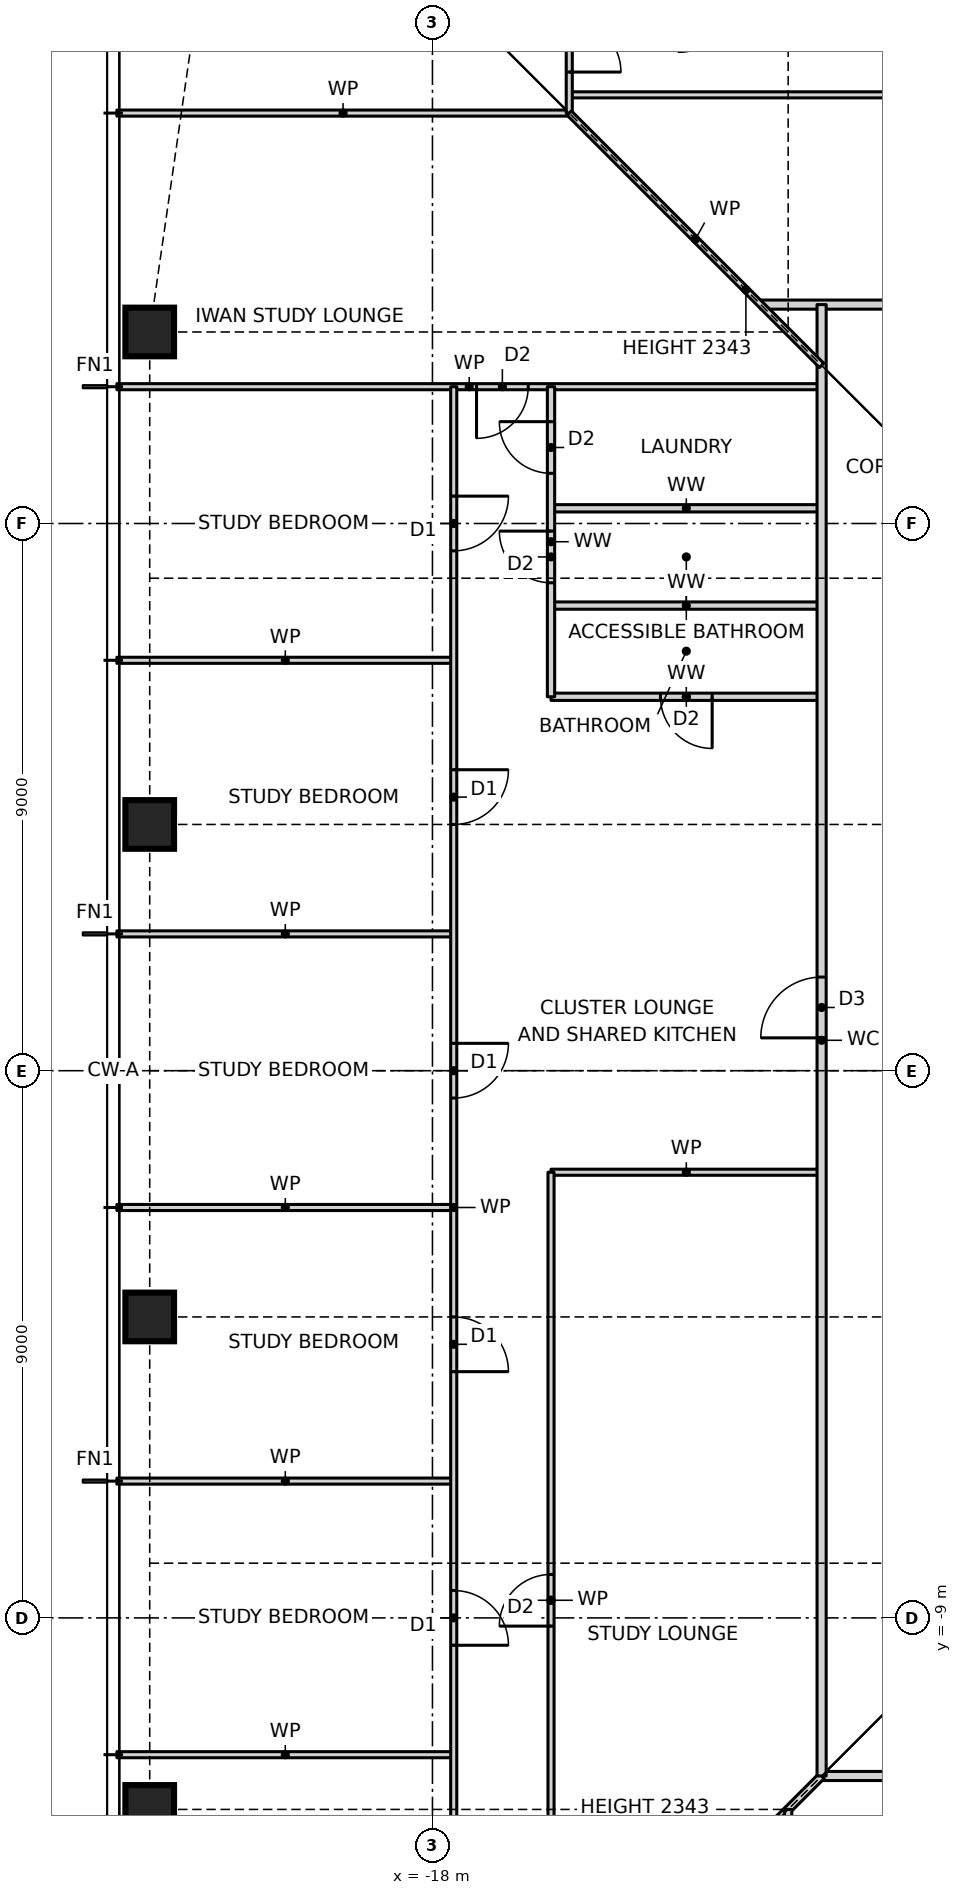
"""IFC4 building model, lengths in metres.
Left out: names, types, materials, properties, quantities, classifications, styles, units other than length and angle.
Written with IfcOpenShell. Run it as: python <this file> out.ifc"""

import sys

from ifc_helpers import new_model, si_unit, direction, frame, frame_2d, origin, origin_2d, place, context, subcontext, project, spatial, rectangle, hollow_rectangle, extrude, element, fill, save


model = new_model("IFC4")
c1 = context("Model", 3, precision=1e-05, world=origin(), true_north=direction((0.0, 1.0)))
c2 = subcontext(c1, "Body", "Model", "MODEL_VIEW")
j1 = project(units=[si_unit("LENGTHUNIT", "METRE"), si_unit("PLANEANGLEUNIT", "RADIAN")], contexts=[c1])
p1 = place(None, origin())
s1 = spatial("IfcSite", under=j1, at=p1, CompositionType="ELEMENT")
p2 = place(p1, origin())
s2 = spatial("IfcBuilding", under=s1, at=p2, CompositionType="ELEMENT")
p3 = place(p2, frame((0.0, 0.0, 39.5)))
s3 = spatial("IfcBuildingStorey", under=s2, at=p3, CompositionType="ELEMENT", Elevation=39.5)
for number, where, z_axis, x_axis in (
    (1, (-22.65, 12.15, 0.0), (0.0, 0.0, 1.0), (1.0, 0.0, 0.0)),
    (2, (-22.65, 4.05, 0.0), (0.0, 0.0, 1.0), (1.0, 0.0, 0.0)),
    (3, (-22.65, -4.05, 0.0), (0.0, 0.0, 1.0), (1.0, 0.0, 0.0)),
    (4, (-22.65, -12.15, 0.0), (0.0, 0.0, 1.0), (1.0, 0.0, 0.0)),
):
    element("IfcColumn", number, at=place(p3, frame(where, z_axis=z_axis, x_axis=x_axis)), inside=s3, PredefinedType="COLUMN", context=c2, shape_type="SweptSolid", body=[
        extrude(hollow_rectangle(XDim=0.8, YDim=0.8, WallThickness=0.09, at=origin_2d()), origin(), (0.0, 0.0, 1.0), 3.5),
    ])
p4 = place(p3, frame((-11.6, -11.6, 0.0), z_axis=(0.0, 0.0, 1.0), x_axis=(1.0, 0.0, 0.0)))
e5 = element("IfcWall", 5, at=p4, inside=s3, PredefinedType="PARTITIONING", context=c2, shape_type="SweptSolid", body=[
    extrude(rectangle(XDim=23.2, YDim=0.15, at=frame_2d((11.6, 0.0))), origin(), (0.0, 0.0, 1.0), 3.27),
])
p5 = place(p4, frame((2.975, 0.0, 0.0)))
e6 = element("IfcOpeningElement", 6, at=p5, cuts=e5, PredefinedType="OPENING", context=c2, shape_type="SweptSolid", body=[
    extrude(rectangle(XDim=1.0, YDim=2.1, at=frame_2d((0.5, 1.05))), frame((0.0, 0.085, 0.0), z_axis=(0.0, -1.0, 0.0), x_axis=(1.0, 0.0, 0.0)), (0.0, 0.0, 1.0), 0.17),
])
p6 = place(p4, frame((18.6, 0.0, 0.0)))
e7 = element("IfcOpeningElement", 7, at=p6, cuts=e5, PredefinedType="OPENING", context=c2, shape_type="SweptSolid", body=[
    extrude(rectangle(XDim=1.0, YDim=2.1, at=frame_2d((0.5, 1.05))), frame((0.0, 0.085, 0.0), z_axis=(0.0, -1.0, 0.0), x_axis=(1.0, 0.0, 0.0)), (0.0, 0.0, 1.0), 0.17),
])
for number, where, z_axis, x_axis in (
    (8, (-23.19, -11.25, 0.0), (0.0, 0.0, 1.0), (1.0, 0.0, 0.0)),
    (9, (-23.19, -6.75, 0.0), (0.0, 0.0, 1.0), (1.0, 0.0, 0.0)),
    (10, (-23.19, -2.25, 0.0), (0.0, 0.0, 1.0), (1.0, 0.0, 0.0)),
):
    element("IfcWall", number, at=place(p3, frame(where, z_axis=z_axis, x_axis=x_axis)), inside=s3, PredefinedType="PARTITIONING", context=c2, shape_type="SweptSolid", body=[
        extrude(rectangle(XDim=5.54, YDim=0.1, at=frame_2d((2.77, 0.0))), origin(), (0.0, 0.0, 1.0), 3.27),
    ])
p7 = place(p3, frame((-16.05, -1.67, 0.0), z_axis=(0.0, 0.0, 1.0), x_axis=(1.0, 0.0, 0.0)))
e11 = element("IfcWall", 11, at=p7, inside=s3, PredefinedType="PARTITIONING", context=c2, shape_type="SweptSolid", body=[
    extrude(rectangle(XDim=4.45, YDim=0.1, at=frame_2d((2.225, 0.0))), origin(), (0.0, 0.0, 1.0), 3.27),
])
p8 = place(p3, frame((-23.19, 2.25, 0.0), z_axis=(0.0, 0.0, 1.0), x_axis=(1.0, 0.0, 0.0)))
e12 = element("IfcWall", 12, at=p8, inside=s3, PredefinedType="PARTITIONING", context=c2, shape_type="SweptSolid", body=[
    extrude(rectangle(XDim=5.54, YDim=0.1, at=frame_2d((2.77, 0.0))), origin(), (0.0, 0.0, 1.0), 3.27),
])
p9 = place(p3, frame((-16.05, 6.15, 0.0), z_axis=(0.0, 0.0, 1.0), x_axis=(1.0, 0.0, 0.0)))
e13 = element("IfcWall", 13, at=p9, inside=s3, PredefinedType="PARTITIONING", context=c2, shape_type="SweptSolid", body=[
    extrude(rectangle(XDim=4.45, YDim=0.12, at=frame_2d((2.225, 0.0))), origin(), (0.0, 0.0, 1.0), 3.27),
])
p10 = place(p9, frame((1.8, 0.0, 0.0)))
e14 = element("IfcOpeningElement", 14, at=p10, cuts=e13, PredefinedType="OPENING", context=c2, shape_type="SweptSolid", body=[
    extrude(rectangle(XDim=0.85, YDim=2.1, at=frame_2d((0.425, 1.05))), frame((0.0, 0.07, 0.0), z_axis=(0.0, -1.0, 0.0), x_axis=(1.0, 0.0, 0.0)), (0.0, 0.0, 1.0), 0.14),
])
p11 = place(p3, frame((-23.19, 6.75, 0.0), z_axis=(0.0, 0.0, 1.0), x_axis=(1.0, 0.0, 0.0)))
e15 = element("IfcWall", 15, at=p11, inside=s3, PredefinedType="PARTITIONING", context=c2, shape_type="SweptSolid", body=[
    extrude(rectangle(XDim=5.54, YDim=0.1, at=frame_2d((2.77, 0.0))), origin(), (0.0, 0.0, 1.0), 3.27),
])
for number, where, z_axis, x_axis in (
    (16, (-16.05, 7.65, 0.0), (0.0, 0.0, 1.0), (1.0, 0.0, 0.0)),
    (17, (-16.05, 9.25, 0.0), (0.0, 0.0, 1.0), (1.0, 0.0, 0.0)),
):
    element("IfcWall", number, at=place(p3, frame(where, z_axis=z_axis, x_axis=x_axis)), inside=s3, PredefinedType="PARTITIONING", context=c2, shape_type="SweptSolid", body=[
        extrude(rectangle(XDim=4.45, YDim=0.12, at=frame_2d((2.225, 0.0))), origin(), (0.0, 0.0, 1.0), 3.27),
    ])
p12 = place(p3, frame((-23.19, 11.25, 0.0), z_axis=(0.0, 0.0, 1.0), x_axis=(1.0, 0.0, 0.0)))
e18 = element("IfcWall", 18, at=p12, inside=s3, PredefinedType="PARTITIONING", context=c2, shape_type="SweptSolid", body=[
    extrude(rectangle(XDim=11.59, YDim=0.1, at=frame_2d((5.795, 0.0))), origin(), (0.0, 0.0, 1.0), 3.27),
])
p13 = place(p12, frame((5.915, 0.0, 0.0)))
e19 = element("IfcOpeningElement", 19, at=p13, cuts=e18, PredefinedType="OPENING", context=c2, shape_type="SweptSolid", body=[
    extrude(rectangle(XDim=0.85, YDim=2.1, at=frame_2d((0.425, 1.05))), frame((0.0, 0.06, 0.0), z_axis=(0.0, -1.0, 0.0), x_axis=(1.0, 0.0, 0.0)), (0.0, 0.0, 1.0), 0.12),
])
p14 = place(p3, frame((-12.6, 12.6, 0.0), z_axis=(0.0, 0.0, 1.0), x_axis=(1.0, 0.0, 0.0)))
e20 = element("IfcWall", 20, at=p14, inside=s3, PredefinedType="PARTITIONING", context=c2, shape_type="SweptSolid", body=[
    extrude(rectangle(XDim=25.2, YDim=0.15, at=frame_2d((12.6, 0.0))), origin(), (0.0, 0.0, 1.0), 3.27),
])
p15 = place(p14, frame((16.15, 0.0, 0.0)))
e21 = element("IfcOpeningElement", 21, at=p15, cuts=e20, PredefinedType="OPENING", context=c2, shape_type="SweptSolid", body=[
    extrude(rectangle(XDim=1.0, YDim=2.1, at=frame_2d((0.5, 1.05))), frame((0.0, 0.085, 0.0), z_axis=(0.0, -1.0, 0.0), x_axis=(1.0, 0.0, 0.0)), (0.0, 0.0, 1.0), 0.17),
])
p16 = place(p14, frame((19.0, 0.0, 0.0)))
e22 = element("IfcOpeningElement", 22, at=p16, cuts=e20, PredefinedType="OPENING", context=c2, shape_type="SweptSolid", body=[
    extrude(rectangle(XDim=0.9, YDim=2.1, at=frame_2d((0.45, 1.05))), frame((0.0, 0.085, 0.0), z_axis=(0.0, -1.0, 0.0), x_axis=(1.0, 0.0, 0.0)), (0.0, 0.0, 1.0), 0.17),
])
p17 = place(p3, frame((-23.19, 15.75, 0.0), z_axis=(0.0, 0.0, 1.0), x_axis=(1.0, 0.0, 0.0)))
e23 = element("IfcWall", 23, at=p17, inside=s3, PredefinedType="PARTITIONING", context=c2, shape_type="SweptSolid", body=[
    extrude(rectangle(XDim=7.44, YDim=0.1, at=frame_2d((3.72, 0.0))), origin(), (0.0, 0.0, 1.0), 3.27),
])
p18 = place(p3, frame((-15.75, 16.05, 0.0), z_axis=(0.0, 0.0, 1.0), x_axis=(1.0, 0.0, 0.0)))
e24 = element("IfcWall", 24, at=p18, inside=s3, PredefinedType="PARTITIONING", context=c2, shape_type="SweptSolid", body=[
    extrude(rectangle(XDim=17.9, YDim=0.1, at=frame_2d((8.95, 0.0))), origin(), (0.0, 0.0, 1.0), 3.27),
])
p19 = place(p18, frame((8.525, 0.0, 0.0)))
e25 = element("IfcOpeningElement", 25, at=p19, cuts=e24, PredefinedType="OPENING", context=c2, shape_type="SweptSolid", body=[
    extrude(rectangle(XDim=0.85, YDim=2.1, at=frame_2d((0.425, 1.05))), frame((0.0, 0.06, 0.0), z_axis=(0.0, -1.0, 0.0), x_axis=(1.0, 0.0, 0.0)), (0.0, 0.0, 1.0), 0.12),
])
p20 = place(p3, frame((-15.75, -15.75, 0.0), z_axis=(0.0, 0.0, 1.0), x_axis=(0.707106781187, 0.707106781187, 0.0)))
e26 = element("IfcWall", 26, at=p20, inside=s3, PredefinedType="PARTITIONING", context=c2, shape_type="SweptSolid", body=[
    extrude(rectangle(XDim=5.869, YDim=0.12, at=frame_2d((2.935, 0.0))), origin(), (0.0, 0.0, 1.0), 2.343),
])
p21 = place(p3, frame((-11.6, -11.6, 0.0), z_axis=(0.0, 0.0, 1.0), x_axis=(0.0, 1.0, 0.0)))
e27 = element("IfcWall", 27, at=p21, inside=s3, PredefinedType="PARTITIONING", context=c2, shape_type="SweptSolid", body=[
    extrude(rectangle(XDim=24.2, YDim=0.15, at=frame_2d((12.1, 0.0))), origin(), (0.0, 0.0, 1.0), 3.27),
])
p22 = place(p21, frame((12.14, 0.0, 0.0)))
e28 = element("IfcOpeningElement", 28, at=p22, cuts=e27, PredefinedType="OPENING", context=c2, shape_type="SweptSolid", body=[
    extrude(rectangle(XDim=1.0, YDim=2.1, at=frame_2d((0.5, 1.05))), frame((0.0, 0.085, 0.0), z_axis=(0.0, -1.0, 0.0), x_axis=(1.0, 0.0, 0.0)), (0.0, 0.0, 1.0), 0.17),
])
p23 = place(p3, frame((-12.15, -16.05, 0.0), z_axis=(0.0, 0.0, 1.0), x_axis=(0.0, 1.0, 0.0)))
e29 = element("IfcWall", 29, at=p23, inside=s3, PredefinedType="PARTITIONING", context=c2, shape_type="SweptSolid", body=[
    extrude(rectangle(XDim=3.9, YDim=0.12, at=frame_2d((1.95, 0.0))), origin(), (0.0, 0.0, 1.0), 2.508),
])
p24 = place(p23, frame((1.525, 0.0, 0.0)))
e30 = element("IfcOpeningElement", 30, at=p24, cuts=e29, PredefinedType="OPENING", context=c2, shape_type="SweptSolid", body=[
    extrude(rectangle(XDim=0.85, YDim=2.1, at=frame_2d((0.425, 1.05))), frame((0.0, 0.07, 0.0), z_axis=(0.0, -1.0, 0.0), x_axis=(1.0, 0.0, 0.0)), (0.0, 0.0, 1.0), 0.14),
])
p25 = place(p3, frame((-15.75, 15.75, 0.0), z_axis=(0.0, 0.0, 1.0), x_axis=(0.0, 1.0, 0.0)))
e31 = element("IfcWall", 31, at=p25, inside=s3, PredefinedType="PARTITIONING", context=c2, shape_type="SweptSolid", body=[
    extrude(rectangle(XDim=7.44, YDim=0.1, at=frame_2d((3.72, 0.0))), origin(), (0.0, 0.0, 1.0), 3.27),
])
p26 = place(p25, frame((0.675, 0.0, 0.0)))
e32 = element("IfcOpeningElement", 32, at=p26, cuts=e31, PredefinedType="OPENING", context=c2, shape_type="SweptSolid", body=[
    extrude(rectangle(XDim=0.85, YDim=2.1, at=frame_2d((0.425, 1.05))), frame((0.0, 0.06, 0.0), z_axis=(0.0, -1.0, 0.0), x_axis=(1.0, 0.0, 0.0)), (0.0, 0.0, 1.0), 0.12),
])
p27 = place(p3, frame((-16.05, -15.75, 0.0), z_axis=(0.0, 0.0, 1.0), x_axis=(0.0, 1.0, 0.0)))
e33 = element("IfcWall", 33, at=p27, inside=s3, PredefinedType="PARTITIONING", context=c2, shape_type="SweptSolid", body=[
    extrude(rectangle(XDim=14.08, YDim=0.1, at=frame_2d((7.04, 0.0))), origin(), (0.0, 0.0, 1.0), 3.27),
])
p28 = place(p27, frame((6.615, 0.0, 0.0)))
e34 = element("IfcOpeningElement", 34, at=p28, cuts=e33, PredefinedType="OPENING", context=c2, shape_type="SweptSolid", body=[
    extrude(rectangle(XDim=0.85, YDim=2.1, at=frame_2d((0.425, 1.05))), frame((0.0, 0.06, 0.0), z_axis=(0.0, -1.0, 0.0), x_axis=(1.0, 0.0, 0.0)), (0.0, 0.0, 1.0), 0.12),
])
p29 = place(p3, frame((-16.05, 6.15, 0.0), z_axis=(0.0, 0.0, 1.0), x_axis=(0.0, 1.0, 0.0)))
e35 = element("IfcWall", 35, at=p29, inside=s3, PredefinedType="PARTITIONING", context=c2, shape_type="SweptSolid", body=[
    extrude(rectangle(XDim=5.1, YDim=0.12, at=frame_2d((2.55, 0.0))), origin(), (0.0, 0.0, 1.0), 3.27),
])
p30 = place(p29, frame((3.675, 0.0, 0.0)))
e36 = element("IfcOpeningElement", 36, at=p30, cuts=e35, PredefinedType="OPENING", context=c2, shape_type="SweptSolid", body=[
    extrude(rectangle(XDim=0.85, YDim=2.1, at=frame_2d((0.425, 1.05))), frame((0.0, 0.07, 0.0), z_axis=(0.0, -1.0, 0.0), x_axis=(1.0, 0.0, 0.0)), (0.0, 0.0, 1.0), 0.14),
])
p31 = place(p29, frame((1.875, 0.0, 0.0)))
e37 = element("IfcOpeningElement", 37, at=p31, cuts=e35, PredefinedType="OPENING", context=c2, shape_type="SweptSolid", body=[
    extrude(rectangle(XDim=0.85, YDim=2.1, at=frame_2d((0.425, 1.05))), frame((0.0, 0.07, 0.0), z_axis=(0.0, -1.0, 0.0), x_axis=(1.0, 0.0, 0.0)), (0.0, 0.0, 1.0), 0.14),
])
p32 = place(p3, frame((-17.65, -15.75, 0.0), z_axis=(0.0, 0.0, 1.0), x_axis=(0.0, 1.0, 0.0)))
e38 = element("IfcWall", 38, at=p32, inside=s3, PredefinedType="PARTITIONING", context=c2, shape_type="SweptSolid", body=[
    extrude(rectangle(XDim=27.0, YDim=0.1, at=frame_2d((13.5, 0.0))), origin(), (0.0, 0.0, 1.0), 3.27),
])
p33 = place(p32, frame((24.3, 0.0, 0.0)))
e39 = element("IfcOpeningElement", 39, at=p33, cuts=e38, PredefinedType="OPENING", context=c2, shape_type="SweptSolid", body=[
    extrude(rectangle(XDim=0.9, YDim=2.1, at=frame_2d((0.45, 1.05))), frame((0.0, 0.06, 0.0), z_axis=(0.0, -1.0, 0.0), x_axis=(1.0, 0.0, 0.0)), (0.0, 0.0, 1.0), 0.12),
])
p34 = place(p32, frame((19.8, 0.0, 0.0)))
e40 = element("IfcOpeningElement", 40, at=p34, cuts=e38, PredefinedType="OPENING", context=c2, shape_type="SweptSolid", body=[
    extrude(rectangle(XDim=0.9, YDim=2.1, at=frame_2d((0.45, 1.05))), frame((0.0, 0.06, 0.0), z_axis=(0.0, -1.0, 0.0), x_axis=(1.0, 0.0, 0.0)), (0.0, 0.0, 1.0), 0.12),
])
p35 = place(p32, frame((15.3, 0.0, 0.0)))
e41 = element("IfcOpeningElement", 41, at=p35, cuts=e38, PredefinedType="OPENING", context=c2, shape_type="SweptSolid", body=[
    extrude(rectangle(XDim=0.9, YDim=2.1, at=frame_2d((0.45, 1.05))), frame((0.0, 0.06, 0.0), z_axis=(0.0, -1.0, 0.0), x_axis=(1.0, 0.0, 0.0)), (0.0, 0.0, 1.0), 0.12),
])
p36 = place(p32, frame((10.8, 0.0, 0.0)))
e42 = element("IfcOpeningElement", 42, at=p36, cuts=e38, PredefinedType="OPENING", context=c2, shape_type="SweptSolid", body=[
    extrude(rectangle(XDim=0.9, YDim=2.1, at=frame_2d((0.45, 1.05))), frame((0.0, 0.06, 0.0), z_axis=(0.0, -1.0, 0.0), x_axis=(1.0, 0.0, 0.0)), (0.0, 0.0, 1.0), 0.12),
])
p37 = place(p32, frame((6.3, 0.0, 0.0)))
e43 = element("IfcOpeningElement", 43, at=p37, cuts=e38, PredefinedType="OPENING", context=c2, shape_type="SweptSolid", body=[
    extrude(rectangle(XDim=0.9, YDim=2.1, at=frame_2d((0.45, 1.05))), frame((0.0, 0.06, 0.0), z_axis=(0.0, -1.0, 0.0), x_axis=(1.0, 0.0, 0.0)), (0.0, 0.0, 1.0), 0.12),
])
p38 = place(p32, frame((1.8, 0.0, 0.0)))
e44 = element("IfcOpeningElement", 44, at=p38, cuts=e38, PredefinedType="OPENING", context=c2, shape_type="SweptSolid", body=[
    extrude(rectangle(XDim=0.9, YDim=2.1, at=frame_2d((0.45, 1.05))), frame((0.0, 0.06, 0.0), z_axis=(0.0, -1.0, 0.0), x_axis=(1.0, 0.0, 0.0)), (0.0, 0.0, 1.0), 0.12),
])
p39 = place(p3, frame((-11.6, 11.6, 0.0), z_axis=(0.0, 0.0, 1.0), x_axis=(-0.707106781187, 0.707106781187, 0.0)))
e45 = element("IfcWall", 45, at=p39, inside=s3, PredefinedType="PARTITIONING", context=c2, shape_type="SweptSolid", body=[
    extrude(rectangle(XDim=5.869, YDim=0.1, at=frame_2d((2.935, 0.0))), origin(), (0.0, 0.0, 1.0), 2.343),
])
p40 = place(p13, frame((0.85, 0.0, 0.0), z_axis=(0.0, 0.0, 1.0), x_axis=(-1.0, 0.0, 0.0)))
e46 = element("IfcDoor", 46, at=p40, inside=s3, OperationType="SINGLE_SWING_RIGHT", PredefinedType="DOOR", context=c2, shape_type="SweptSolid", body=[
    extrude(rectangle(XDim=0.85, YDim=2.1, at=frame_2d((0.425, 1.05))), frame((0.0, 0.025, 0.0), z_axis=(0.0, -1.0, 0.0), x_axis=(1.0, 0.0, 0.0)), (0.0, 0.0, 1.0), 0.05),
])
fill(e19, e46)
p41 = place(p33, frame((0.9, 0.0, 0.0), z_axis=(0.0, 0.0, 1.0), x_axis=(-1.0, 0.0, 0.0)))
e47 = element("IfcDoor", 47, at=p41, inside=s3, OperationType="SINGLE_SWING_LEFT", PredefinedType="DOOR", context=c2, shape_type="SweptSolid", body=[
    extrude(rectangle(XDim=0.9, YDim=2.1, at=frame_2d((0.45, 1.05))), frame((0.0, 0.025, 0.0), z_axis=(0.0, -1.0, 0.0), x_axis=(1.0, 0.0, 0.0)), (0.0, 0.0, 1.0), 0.05),
])
fill(e39, e47)
p42 = place(p34, frame((0.9, 0.0, 0.0), z_axis=(0.0, 0.0, 1.0), x_axis=(-1.0, 0.0, 0.0)))
e48 = element("IfcDoor", 48, at=p42, inside=s3, OperationType="SINGLE_SWING_LEFT", PredefinedType="DOOR", context=c2, shape_type="SweptSolid", body=[
    extrude(rectangle(XDim=0.9, YDim=2.1, at=frame_2d((0.45, 1.05))), frame((0.0, 0.025, 0.0), z_axis=(0.0, -1.0, 0.0), x_axis=(1.0, 0.0, 0.0)), (0.0, 0.0, 1.0), 0.05),
])
fill(e40, e48)
p43 = place(p35, frame((0.9, 0.0, 0.0), z_axis=(0.0, 0.0, 1.0), x_axis=(-1.0, 0.0, 0.0)))
e49 = element("IfcDoor", 49, at=p43, inside=s3, OperationType="SINGLE_SWING_LEFT", PredefinedType="DOOR", context=c2, shape_type="SweptSolid", body=[
    extrude(rectangle(XDim=0.9, YDim=2.1, at=frame_2d((0.45, 1.05))), frame((0.0, 0.025, 0.0), z_axis=(0.0, -1.0, 0.0), x_axis=(1.0, 0.0, 0.0)), (0.0, 0.0, 1.0), 0.05),
])
fill(e41, e49)
p44 = place(p36, frame((0.9, 0.0, 0.0), z_axis=(0.0, 0.0, 1.0), x_axis=(-1.0, 0.0, 0.0)))
e50 = element("IfcDoor", 50, at=p44, inside=s3, OperationType="SINGLE_SWING_RIGHT", PredefinedType="DOOR", context=c2, shape_type="SweptSolid", body=[
    extrude(rectangle(XDim=0.9, YDim=2.1, at=frame_2d((0.45, 1.05))), frame((0.0, 0.025, 0.0), z_axis=(0.0, -1.0, 0.0), x_axis=(1.0, 0.0, 0.0)), (0.0, 0.0, 1.0), 0.05),
])
fill(e42, e50)
p45 = place(p37, frame((0.9, 0.0, 0.0), z_axis=(0.0, 0.0, 1.0), x_axis=(-1.0, 0.0, 0.0)))
e51 = element("IfcDoor", 51, at=p45, inside=s3, OperationType="SINGLE_SWING_RIGHT", PredefinedType="DOOR", context=c2, shape_type="SweptSolid", body=[
    extrude(rectangle(XDim=0.9, YDim=2.1, at=frame_2d((0.45, 1.05))), frame((0.0, 0.025, 0.0), z_axis=(0.0, -1.0, 0.0), x_axis=(1.0, 0.0, 0.0)), (0.0, 0.0, 1.0), 0.05),
])
fill(e43, e51)
p46 = place(p22, origin())
e52 = element("IfcDoor", 52, at=p46, inside=s3, OperationType="SINGLE_SWING_LEFT", PredefinedType="DOOR", context=c2, shape_type="SweptSolid", body=[
    extrude(rectangle(XDim=1.0, YDim=2.1, at=frame_2d((0.5, 1.05))), frame((0.0, 0.025, 0.0), z_axis=(0.0, -1.0, 0.0), x_axis=(1.0, 0.0, 0.0)), (0.0, 0.0, 1.0), 0.05),
])
fill(e28, e52)
p47 = place(p30, origin())
e53 = element("IfcDoor", 53, at=p47, inside=s3, OperationType="SINGLE_SWING_RIGHT", PredefinedType="DOOR", context=c2, shape_type="SweptSolid", body=[
    extrude(rectangle(XDim=0.85, YDim=2.1, at=frame_2d((0.425, 1.05))), frame((0.0, 0.025, 0.0), z_axis=(0.0, -1.0, 0.0), x_axis=(1.0, 0.0, 0.0)), (0.0, 0.0, 1.0), 0.05),
])
fill(e36, e53)
p48 = place(p31, origin())
e54 = element("IfcDoor", 54, at=p48, inside=s3, OperationType="SINGLE_SWING_RIGHT", PredefinedType="DOOR", context=c2, shape_type="SweptSolid", body=[
    extrude(rectangle(XDim=0.85, YDim=2.1, at=frame_2d((0.425, 1.05))), frame((0.0, 0.025, 0.0), z_axis=(0.0, -1.0, 0.0), x_axis=(1.0, 0.0, 0.0)), (0.0, 0.0, 1.0), 0.05),
])
fill(e37, e54)
p49 = place(p10, frame((0.85, 0.0, 0.0), z_axis=(0.0, 0.0, 1.0), x_axis=(-1.0, 0.0, 0.0)))
e55 = element("IfcDoor", 55, at=p49, inside=s3, OperationType="SINGLE_SWING_LEFT", PredefinedType="DOOR", context=c2, shape_type="SweptSolid", body=[
    extrude(rectangle(XDim=0.85, YDim=2.1, at=frame_2d((0.425, 1.05))), frame((0.0, 0.025, 0.0), z_axis=(0.0, -1.0, 0.0), x_axis=(1.0, 0.0, 0.0)), (0.0, 0.0, 1.0), 0.05),
])
fill(e14, e55)
p50 = place(p28, origin())
e56 = element("IfcDoor", 56, at=p50, inside=s3, OperationType="SINGLE_SWING_LEFT", PredefinedType="DOOR", context=c2, shape_type="SweptSolid", body=[
    extrude(rectangle(XDim=0.85, YDim=2.1, at=frame_2d((0.425, 1.05))), frame((0.0, 0.025, 0.0), z_axis=(0.0, -1.0, 0.0), x_axis=(1.0, 0.0, 0.0)), (0.0, 0.0, 1.0), 0.05),
])
fill(e34, e56)
p51 = place(p26, frame((0.85, 0.0, 0.0), z_axis=(0.0, 0.0, 1.0), x_axis=(-1.0, 0.0, 0.0)))
e57 = element("IfcDoor", 57, at=p51, inside=s3, OperationType="SINGLE_SWING_RIGHT", PredefinedType="DOOR", context=c2, shape_type="SweptSolid", body=[
    extrude(rectangle(XDim=0.85, YDim=2.1, at=frame_2d((0.425, 1.05))), frame((0.0, 0.025, 0.0), z_axis=(0.0, -1.0, 0.0), x_axis=(1.0, 0.0, 0.0)), (0.0, 0.0, 1.0), 0.05),
])
fill(e32, e57)
save(model, sys.argv[1])
